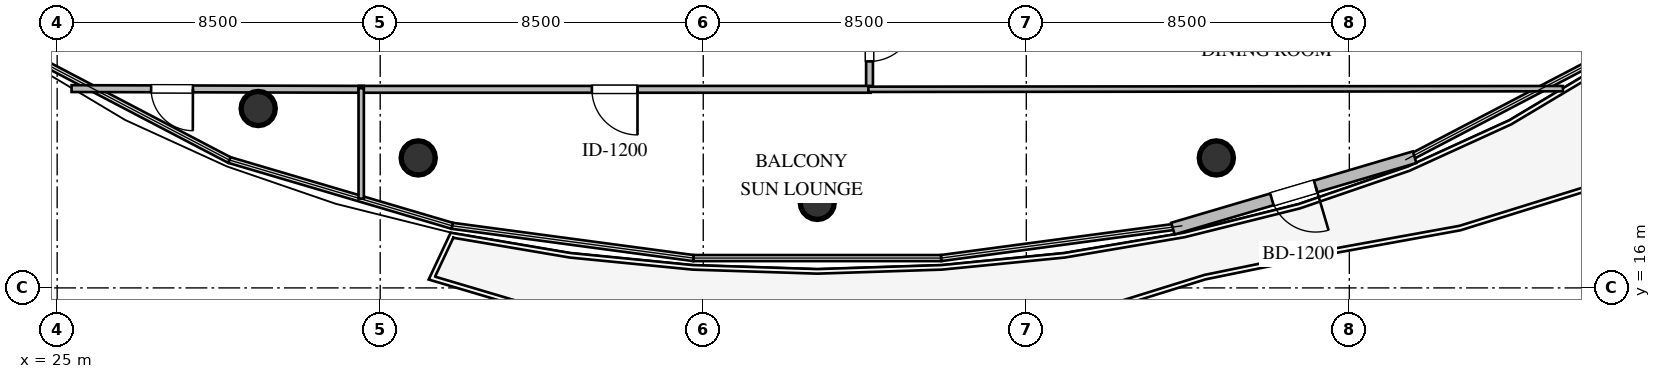
"""IFC4 building model, lengths in metres.
Left out: names, types, materials, properties, quantities, classifications, styles, units other than length and angle.
Written with IfcOpenShell. Run it as: python <this file> out.ifc"""

import sys

from ifc_helpers import new_model, si_unit, direction, frame, frame_2d, origin, origin_2d, place, context, subcontext, project, spatial, rectangle, circle, extrude, element, fill, save


model = new_model("IFC4")
c1 = context("Model", 3, precision=1e-05, world=origin(), true_north=direction((0.0, 1.0)))
c2 = subcontext(c1, "Body", "Model", "MODEL_VIEW")
j1 = project(units=[si_unit("LENGTHUNIT", "METRE"), si_unit("PLANEANGLEUNIT", "RADIAN")], contexts=[c1])
p1 = place(None, origin())
s1 = spatial("IfcSite", under=j1, at=p1, CompositionType="ELEMENT")
p2 = place(p1, origin())
s2 = spatial("IfcBuilding", under=s1, at=p2, CompositionType="ELEMENT")
p3 = place(p2, frame((0.0, 0.0, 289.0)))
s3 = spatial("IfcBuildingStorey", under=s2, at=p3, CompositionType="ELEMENT", Elevation=289.0)
for number, where, z_axis, x_axis in (
    (1, (30.29, 20.72, 0.0), (0.0, 0.0, 1.0), (1.0, 0.0, 0.0)),
    (2, (34.5, 19.42, 0.0), (0.0, 0.0, 1.0), (1.0, 0.0, 0.0)),
    (3, (45.0, 18.25, 0.0), (0.0, 0.0, 1.0), (1.0, 0.0, 0.0)),
    (4, (55.5, 19.42, 0.0), (0.0, 0.0, 1.0), (1.0, 0.0, 0.0)),
):
    element("IfcColumn", number, at=place(p3, frame(where, z_axis=z_axis, x_axis=x_axis)), inside=s3, PredefinedType="COLUMN", context=c2, shape_type="SweptSolid", body=[
        extrude(circle(Radius=0.45, at=origin_2d()), origin(), (0.0, 0.0, 1.0), 3.8),
    ])
p4 = place(p3, frame((60.718, 19.439, 0.0), z_axis=(0.0, 0.0, 1.0), x_axis=(-0.959026574291, -0.283316130503, 0.0)))
e5 = element("IfcWall", 5, at=p4, inside=s3, PredefinedType="STANDARD", context=c2, shape_type="SweptSolid", body=[
    extrude(rectangle(XDim=6.632, YDim=0.32, at=frame_2d((3.316, 0.0))), origin(), (0.0, 0.0, 1.0), 3.48),
])
p5 = place(p4, frame((2.716, 0.0, 0.0)))
e6 = element("IfcOpeningElement", 6, at=p5, cuts=e5, PredefinedType="OPENING", context=c2, shape_type="SweptSolid", body=[
    extrude(rectangle(XDim=1.2, YDim=2.15, at=frame_2d((0.6, 1.075))), frame((0.0, 0.17, 0.0), z_axis=(0.0, -1.0, 0.0), x_axis=(1.0, 0.0, 0.0)), (0.0, 0.0, 1.0), 0.34),
])
p6 = place(p3, frame((46.375, 23.925, 0.0), z_axis=(0.0, 0.0, 1.0), x_axis=(0.0, -1.0, 0.0)))
e7 = element("IfcWall", 7, at=p6, inside=s3, PredefinedType="PARTITIONING", context=c2, shape_type="SweptSolid", body=[
    extrude(rectangle(XDim=2.73, YDim=0.18, at=frame_2d((1.365, 0.0))), origin(), (0.0, 0.0, 1.0), 3.48),
])
p7 = place(p6, frame((0.765, 0.0, 0.0)))
e8 = element("IfcOpeningElement", 8, at=p7, cuts=e7, PredefinedType="OPENING", context=c2, shape_type="SweptSolid", body=[
    extrude(rectangle(XDim=1.2, YDim=2.15, at=frame_2d((0.6, 1.075))), frame((0.0, 0.1, 0.0), z_axis=(0.0, -1.0, 0.0), x_axis=(1.0, 0.0, 0.0)), (0.0, 0.0, 1.0), 0.2),
])
p8 = place(p3, frame((33.065, 21.225, 0.0), z_axis=(0.0, 0.0, 1.0), x_axis=(-0.999997008942, 0.002445834753, 0.0)))
e9 = element("IfcWall", 9, at=p8, inside=s3, PredefinedType="PARTITIONING", context=c2, shape_type="SweptSolid", body=[
    extrude(rectangle(XDim=7.686, YDim=0.18, at=frame_2d((3.843, 0.0))), origin(), (0.0, 0.0, 1.0), 2.937),
])
p9 = place(p8, frame((4.493, 0.0, 0.0)))
e10 = element("IfcOpeningElement", 10, at=p9, cuts=e9, PredefinedType="OPENING", context=c2, shape_type="SweptSolid", body=[
    extrude(rectangle(XDim=1.1, YDim=2.1, at=frame_2d((0.55, 1.05))), frame((0.0, 0.1, 0.0), z_axis=(0.0, -1.0, 0.0), x_axis=(1.0, 0.0, 0.0)), (0.0, 0.0, 1.0), 0.2),
])
p10 = place(p3, frame((46.405, 21.225, 0.0), z_axis=(0.0, 0.0, 1.0), x_axis=(-1.0, 0.0, 0.0)))
e11 = element("IfcWall", 11, at=p10, inside=s3, PredefinedType="PARTITIONING", context=c2, shape_type="SweptSolid", body=[
    extrude(rectangle(XDim=13.47, YDim=0.18, at=frame_2d((6.735, 0.0))), origin(), (0.0, 0.0, 1.0), 3.116),
])
p11 = place(p10, frame((6.135, 0.0, 0.0)))
e12 = element("IfcOpeningElement", 12, at=p11, cuts=e11, PredefinedType="OPENING", context=c2, shape_type="SweptSolid", body=[
    extrude(rectangle(XDim=1.2, YDim=2.15, at=frame_2d((0.6, 1.075))), frame((0.0, 0.1, 0.0), z_axis=(0.0, -1.0, 0.0), x_axis=(1.0, 0.0, 0.0)), (0.0, 0.0, 1.0), 0.2),
])
p12 = place(p3, frame((64.621, 21.243, 0.0), z_axis=(0.0, 0.0, 1.0), x_axis=(-0.999999524525, -0.000975166183, 0.0)))
e13 = element("IfcWall", 13, at=p12, inside=s3, PredefinedType="PARTITIONING", context=c2, shape_type="SweptSolid", body=[
    extrude(rectangle(XDim=18.276, YDim=0.14, at=frame_2d((9.138, 0.0))), origin(), (0.0, 0.0, 1.0), 3.116),
])
p13 = place(p3, frame((33.0, 21.255, 0.0), z_axis=(0.0, 0.0, 1.0), x_axis=(0.0, -1.0, 0.0)))
e14 = element("IfcWall", 14, at=p13, inside=s3, PredefinedType="PARTITIONING", context=c2, shape_type="SweptSolid", body=[
    extrude(rectangle(XDim=2.904, YDim=0.14, at=frame_2d((1.452, 0.0))), origin(), (0.0, 0.0, 1.0), 3.48),
])
p14 = place(p5, origin())
e15 = element("IfcDoor", 15, at=p14, inside=s3, OperationType="SINGLE_SWING_LEFT", PredefinedType="DOOR", context=c2, shape_type="SweptSolid", body=[
    extrude(rectangle(XDim=1.2, YDim=2.15, at=frame_2d((0.6, 1.075))), frame((0.0, 0.025, 0.0), z_axis=(0.0, -1.0, 0.0), x_axis=(1.0, 0.0, 0.0)), (0.0, 0.0, 1.0), 0.05),
])
fill(e6, e15)
p15 = place(p7, origin())
e16 = element("IfcDoor", 16, at=p15, inside=s3, OperationType="SINGLE_SWING_LEFT", PredefinedType="DOOR", context=c2, shape_type="SweptSolid", body=[
    extrude(rectangle(XDim=1.2, YDim=2.15, at=frame_2d((0.6, 1.075))), frame((0.0, 0.025, 0.0), z_axis=(0.0, -1.0, 0.0), x_axis=(1.0, 0.0, 0.0)), (0.0, 0.0, 1.0), 0.05),
])
fill(e8, e16)
p16 = place(p9, origin())
e17 = element("IfcDoor", 17, at=p16, inside=s3, OperationType="SINGLE_SWING_LEFT", PredefinedType="DOOR", context=c2, shape_type="SweptSolid", body=[
    extrude(rectangle(XDim=1.1, YDim=2.1, at=frame_2d((0.55, 1.05))), frame((0.0, 0.025, 0.0), z_axis=(0.0, -1.0, 0.0), x_axis=(1.0, 0.0, 0.0)), (0.0, 0.0, 1.0), 0.05),
])
fill(e10, e17)
p17 = place(p11, origin())
e18 = element("IfcDoor", 18, at=p17, inside=s3, OperationType="SINGLE_SWING_LEFT", PredefinedType="DOOR", context=c2, shape_type="SweptSolid", body=[
    extrude(rectangle(XDim=1.2, YDim=2.15, at=frame_2d((0.6, 1.075))), frame((0.0, 0.025, 0.0), z_axis=(0.0, -1.0, 0.0), x_axis=(1.0, 0.0, 0.0)), (0.0, 0.0, 1.0), 0.05),
])
fill(e12, e18)
save(model, sys.argv[1])
